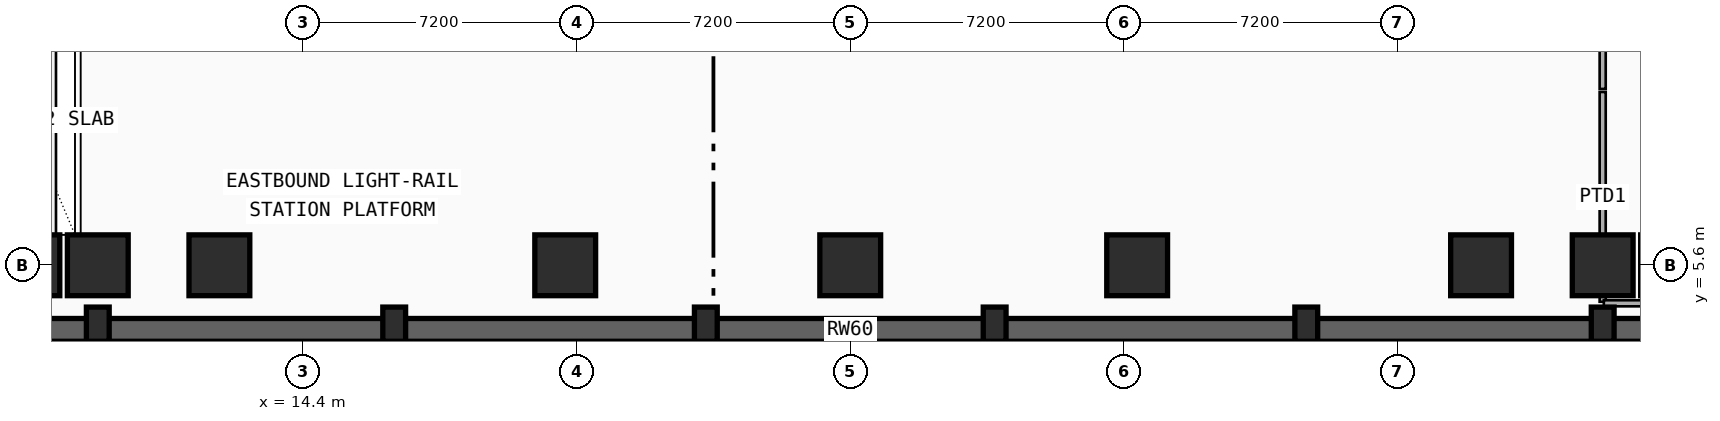
"""IFC4 building model, lengths in metres.
Left out: names, types, materials, properties, quantities, classifications, styles, units other than length and angle.
Written with IfcOpenShell. Run it as: python <this file> out.ifc"""

import sys

from ifc_helpers import new_model, si_unit, direction, frame, frame_2d, origin, origin_2d, place, context, subcontext, project, spatial, rectangle, extrude, element, save


model = new_model("IFC4")
c1 = context("Model", 3, precision=1e-05, world=origin(), true_north=direction((0.0, 1.0)))
c2 = subcontext(c1, "Body", "Model", "MODEL_VIEW")
j1 = project(units=[si_unit("LENGTHUNIT", "METRE"), si_unit("PLANEANGLEUNIT", "RADIAN")], contexts=[c1])
p1 = place(None, origin())
s1 = spatial("IfcSite", under=j1, at=p1, CompositionType="ELEMENT")
p2 = place(p1, origin())
s2 = spatial("IfcBuilding", under=s1, at=p2, CompositionType="ELEMENT")
p3 = place(p2, frame((0.0, 0.0, -4.4)))
s3 = spatial("IfcBuildingStorey", under=s2, at=p3, CompositionType="ELEMENT", Elevation=-4.4)
p4 = place(p3, frame((0.3, 3.9, 0.0), z_axis=(0.0, 0.0, 1.0), x_axis=(1.0, 0.0, 0.0)))
e1 = element("IfcWall", 1, at=p4, inside=s3, PredefinedType="USERDEFINED", context=c2, shape_type="SweptSolid", body=[
    extrude(rectangle(XDim=57.0, YDim=0.6, at=frame_2d((28.5, 0.0))), origin(), (0.0, 0.0, 1.0), 4.4),
])
for number, where, z_axis, x_axis in (
    (2, (7.2, 5.6, 0.0), (0.0, 0.0, 1.0), (1.0, 0.0, 0.0)),
    (3, (9.0, 5.6, 0.0), (0.0, 0.0, 1.0), (1.0, 0.0, 0.0)),
    (4, (12.2, 5.6, 0.0), (0.0, 0.0, 1.0), (1.0, 0.0, 0.0)),
    (5, (21.3, 5.6, 0.0), (0.0, 0.0, 1.0), (1.0, 0.0, 0.0)),
    (6, (28.8, 5.6, 0.0), (0.0, 0.0, 1.0), (1.0, 0.0, 0.0)),
    (7, (36.35, 5.6, 0.0), (0.0, 0.0, 1.0), (1.0, 0.0, 0.0)),
    (8, (45.4, 5.6, 0.0), (0.0, 0.0, 1.0), (1.0, 0.0, 0.0)),
    (9, (48.6, 5.6, 0.0), (0.0, 0.0, 1.0), (1.0, 0.0, 0.0)),
    (10, (50.4, 5.6, 0.0), (0.0, 0.0, 1.0), (1.0, 0.0, 0.0)),
):
    element("IfcColumn", number, at=place(p3, frame(where, z_axis=z_axis, x_axis=x_axis)), inside=s3, PredefinedType="COLUMN", context=c2, shape_type="SweptSolid", body=[
        extrude(rectangle(XDim=1.6, YDim=1.6, at=origin_2d()), origin(), (0.0, 0.0, 1.0), 4.4),
    ])
for number, where, z_axis, x_axis in (
    (11, (9.0, 4.05, 0.0), (0.0, 0.0, 1.0), (1.0, 0.0, 0.0)),
    (12, (16.8, 4.05, 0.0), (0.0, 0.0, 1.0), (1.0, 0.0, 0.0)),
    (13, (25.0, 4.05, 0.0), (0.0, 0.0, 1.0), (1.0, 0.0, 0.0)),
    (14, (32.6, 4.05, 0.0), (0.0, 0.0, 1.0), (1.0, 0.0, 0.0)),
    (15, (40.8, 4.05, 0.0), (0.0, 0.0, 1.0), (1.0, 0.0, 0.0)),
    (16, (48.6, 4.05, 0.0), (0.0, 0.0, 1.0), (1.0, 0.0, 0.0)),
):
    element("IfcColumn", number, at=place(p3, frame(where, z_axis=z_axis, x_axis=x_axis)), inside=s3, PredefinedType="PILASTER", context=c2, shape_type="SweptSolid", body=[
        extrude(rectangle(XDim=0.6, YDim=0.9, at=origin_2d()), origin(), (0.0, 0.0, 1.0), 4.4),
    ])
p5 = place(p3, frame((48.6, 4.64, 0.0), z_axis=(0.0, 0.0, 1.0), x_axis=(0.0, 1.0, 0.0)))
e17 = element("IfcWall", 17, at=p5, inside=s3, PredefinedType="PARTITIONING", context=c2, shape_type="SweptSolid", body=[
    extrude(rectangle(XDim=5.52, YDim=0.16, at=frame_2d((2.76, 0.0))), origin(), (0.0, 0.0, 1.0), 2.63),
])
p6 = place(p3, frame((48.6, 10.24, 0.0), z_axis=(0.0, 0.0, 1.0), x_axis=(0.0, 1.0, 0.0)))
e18 = element("IfcWall", 18, at=p6, inside=s3, PredefinedType="PARTITIONING", context=c2, shape_type="SweptSolid", body=[
    extrude(rectangle(XDim=5.32, YDim=0.16, at=frame_2d((2.66, 0.0))), origin(), (0.0, 0.0, 1.0), 3.022),
])
p7 = place(p3, frame((48.63, 4.6, 0.0), z_axis=(0.0, 0.0, 1.0), x_axis=(1.0, 0.0, 0.0)))
e19 = element("IfcWall", 19, at=p7, inside=s3, PredefinedType="PARTITIONING", context=c2, shape_type="SweptSolid", body=[
    extrude(rectangle(XDim=7.94, YDim=0.16, at=frame_2d((3.97, 0.0))), origin(), (0.0, 0.0, 1.0), 4.05),
])
save(model, sys.argv[1])
